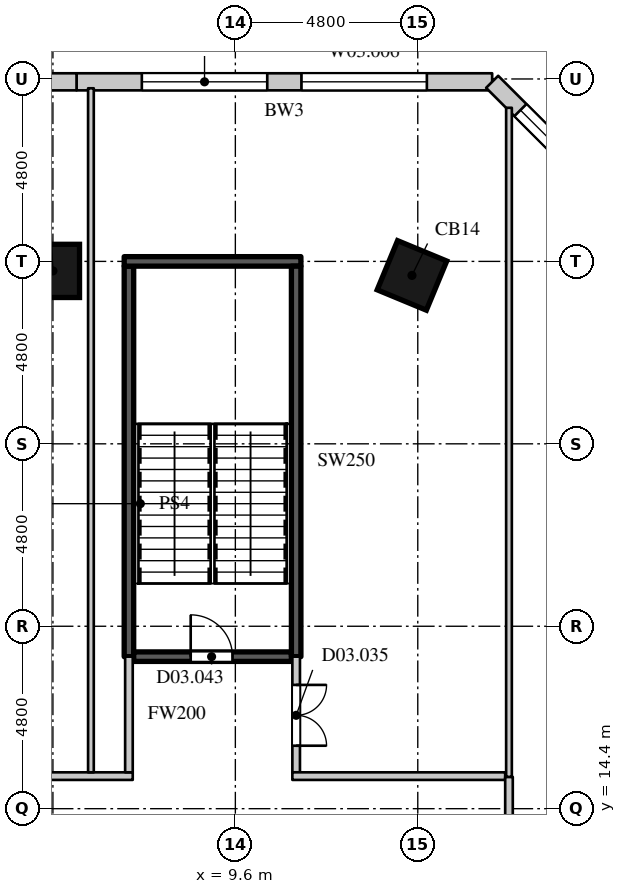
"""IFC4 building model, lengths in metres.
Left out: names, types, materials, properties, quantities, classifications, styles, units other than length and angle.
Written with IfcOpenShell. Run it as: python <this file> out.ifc"""

import sys

from ifc_helpers import new_model, si_unit, direction, frame, frame_2d, origin, origin_2d, place, context, subcontext, project, spatial, rectangle, extrude, element, fill, save


model = new_model("IFC4")
c1 = context("Model", 3, precision=1e-05, world=origin(), true_north=direction((0.0, 1.0)))
c2 = subcontext(c1, "Body", "Model", "MODEL_VIEW")
j1 = project(units=[si_unit("LENGTHUNIT", "METRE"), si_unit("PLANEANGLEUNIT", "RADIAN")], contexts=[c1])
p1 = place(None, origin())
s1 = spatial("IfcSite", under=j1, at=p1, CompositionType="ELEMENT")
p2 = place(p1, origin())
s2 = spatial("IfcBuilding", under=s1, at=p2, CompositionType="ELEMENT")
p3 = place(p2, frame((0.0, 0.0, 16.0)))
s3 = spatial("IfcBuildingStorey", under=s2, at=p3, CompositionType="ELEMENT", Elevation=16.0)
for number, where, z_axis, x_axis in (
    (1, (14.247, 28.431, 0.0), (0.0, 0.0, 1.0), (-0.924, 0.383, 0.0)),
    (2, (4.8, 28.55, 0.0), (0.0, 0.0, 1.0), (-1.0, 0.0, 0.0)),
):
    element("IfcColumn", number, at=place(p3, frame(where, z_axis=z_axis, x_axis=x_axis)), inside=s3, PredefinedType="COLUMN", context=c2, shape_type="SweptSolid", body=[
        extrude(rectangle(XDim=1.4, YDim=1.4, at=origin_2d()), origin(), (0.0, 0.0, 1.0), 5.0),
    ])
p4 = place(p3, frame((22.102, 27.781, 0.0), z_axis=(0.0, 0.0, 1.0), x_axis=(-0.70712180699, 0.707091755064, 0.0)))
e3 = element("IfcWall", 3, at=p4, inside=s3, PredefinedType="ELEMENTEDWALL", context=c2, shape_type="SweptSolid", body=[
    extrude(rectangle(XDim=8.124, YDim=0.45, at=frame_2d((4.062, 0.0))), origin(), (0.0, 0.0, 1.0), 4.7),
])
p5 = place(p4, frame((0.312, 0.0, 1.05)))
e4 = element("IfcOpeningElement", 4, at=p5, cuts=e3, PredefinedType="OPENING", context=c2, shape_type="SweptSolid", body=[
    extrude(rectangle(XDim=3.3, YDim=2.7, at=frame_2d((1.65, 1.35))), frame((0.0, 0.235, 0.0), z_axis=(0.0, -1.0, 0.0), x_axis=(1.0, 0.0, 0.0)), (0.0, 0.0, 1.0), 0.47),
])
p6 = place(p4, frame((4.512, 0.0, 1.05)))
e5 = element("IfcOpeningElement", 5, at=p6, cuts=e3, PredefinedType="OPENING", context=c2, shape_type="SweptSolid", body=[
    extrude(rectangle(XDim=2.56, YDim=2.7, at=frame_2d((1.28, 1.35))), frame((0.0, 0.235, 0.0), z_axis=(0.0, -1.0, 0.0), x_axis=(1.0, 0.0, 0.0)), (0.0, 0.0, 1.0), 0.47),
])
p7 = place(p3, frame((16.357, 33.525, 0.0), z_axis=(0.0, 0.0, 1.0), x_axis=(-1.0, 0.0, 0.0)))
e6 = element("IfcWall", 6, at=p7, inside=s3, PredefinedType="ELEMENTEDWALL", context=c2, shape_type="SweptSolid", body=[
    extrude(rectangle(XDim=10.936, YDim=0.45, at=frame_2d((5.468, 0.0))), origin(), (0.0, 0.0, 1.0), 4.7),
])
p8 = place(p7, frame((1.718, 0.0, 1.05)))
e7 = element("IfcOpeningElement", 7, at=p8, cuts=e6, PredefinedType="OPENING", context=c2, shape_type="SweptSolid", body=[
    extrude(rectangle(XDim=3.3, YDim=2.7, at=frame_2d((1.65, 1.35))), frame((0.0, 0.235, 0.0), z_axis=(0.0, -1.0, 0.0), x_axis=(1.0, 0.0, 0.0)), (0.0, 0.0, 1.0), 0.47),
])
p9 = place(p7, frame((5.918, 0.0, 1.05)))
e8 = element("IfcOpeningElement", 8, at=p9, cuts=e6, PredefinedType="OPENING", context=c2, shape_type="SweptSolid", body=[
    extrude(rectangle(XDim=3.3, YDim=2.7, at=frame_2d((1.65, 1.35))), frame((0.0, 0.235, 0.0), z_axis=(0.0, -1.0, 0.0), x_axis=(1.0, 0.0, 0.0)), (0.0, 0.0, 1.0), 0.47),
])
p10 = place(p3, frame((5.421, 33.525, 0.0), z_axis=(0.0, 0.0, 1.0), x_axis=(-1.0, 0.0, 0.0)))
e9 = element("IfcWall", 9, at=p10, inside=s3, PredefinedType="ELEMENTEDWALL", context=c2, shape_type="SweptSolid", body=[
    extrude(rectangle(XDim=10.843, YDim=0.45, at=frame_2d((5.421, 0.0))), origin(), (0.0, 0.0, 1.0), 4.7),
])
p11 = place(p10, frame((1.511, 0.0, 0.0)))
e10 = element("IfcOpeningElement", 10, at=p11, cuts=e9, PredefinedType="OPENING", context=c2, shape_type="SweptSolid", body=[
    extrude(rectangle(XDim=2.4, YDim=2.7, at=frame_2d((1.2, 1.35))), frame((0.0, 0.235, 0.0), z_axis=(0.0, -1.0, 0.0), x_axis=(1.0, 0.0, 0.0)), (0.0, 0.0, 1.0), 0.47),
])
p12 = place(p10, frame((5.871, 0.0, 1.05)))
e11 = element("IfcOpeningElement", 11, at=p12, cuts=e9, PredefinedType="OPENING", context=c2, shape_type="SweptSolid", body=[
    extrude(rectangle(XDim=3.3, YDim=2.7, at=frame_2d((1.65, 1.35))), frame((0.0, 0.235, 0.0), z_axis=(0.0, -1.0, 0.0), x_axis=(1.0, 0.0, 0.0)), (0.0, 0.0, 1.0), 0.47),
])
p13 = place(p3, frame((-6.9, 15.257, 0.0), z_axis=(0.0, 0.0, 1.0), x_axis=(1.0, 0.0, 0.0)))
e12 = element("IfcWall", 12, at=p13, inside=s3, PredefinedType="PARTITIONING", context=c2, shape_type="SweptSolid", body=[
    extrude(rectangle(XDim=13.8, YDim=0.2, at=frame_2d((6.9, 0.0))), origin(), (0.0, 0.0, 1.0), 4.4),
])
p14 = place(p13, frame((6.1, 0.0, 0.0)))
e13 = element("IfcOpeningElement", 13, at=p14, cuts=e12, PredefinedType="OPENING", context=c2, shape_type="SweptSolid", body=[
    extrude(rectangle(XDim=1.6, YDim=2.4, at=frame_2d((0.8, 1.2))), frame((0.0, 0.11, 0.0), z_axis=(0.0, -1.0, 0.0), x_axis=(1.0, 0.0, 0.0)), (0.0, 0.0, 1.0), 0.22),
])
p15 = place(p3, frame((6.8, 15.357, 0.0), z_axis=(0.0, 0.0, 1.0), x_axis=(0.0, 1.0, 0.0)))
e14 = element("IfcWall", 14, at=p15, inside=s3, PredefinedType="PARTITIONING", context=c2, shape_type="SweptSolid", body=[
    extrude(rectangle(XDim=3.043, YDim=0.2, at=frame_2d((1.521, 0.0))), origin(), (0.0, 0.0, 1.0), 4.4),
])
p16 = place(p3, frame((11.2, 15.357, 0.0), z_axis=(0.0, 0.0, 1.0), x_axis=(0.0, 1.0, 0.0)))
e15 = element("IfcWall", 15, at=p16, inside=s3, PredefinedType="PARTITIONING", context=c2, shape_type="SweptSolid", body=[
    extrude(rectangle(XDim=3.043, YDim=0.2, at=frame_2d((1.521, 0.0))), origin(), (0.0, 0.0, 1.0), 4.4),
])
p17 = place(p16, frame((0.7, 0.0, 0.0)))
e16 = element("IfcOpeningElement", 16, at=p17, cuts=e15, PredefinedType="OPENING", context=c2, shape_type="SweptSolid", body=[
    extrude(rectangle(XDim=1.6, YDim=2.4, at=frame_2d((0.8, 1.2))), frame((0.0, 0.11, 0.0), z_axis=(0.0, -1.0, 0.0), x_axis=(1.0, 0.0, 0.0)), (0.0, 0.0, 1.0), 0.22),
])
p18 = place(p3, frame((11.1, 15.257, 0.0), z_axis=(0.0, 0.0, 1.0), x_axis=(1.0, 0.0, 0.0)))
e17 = element("IfcWall", 17, at=p18, inside=s3, PredefinedType="PARTITIONING", context=c2, shape_type="SweptSolid", body=[
    extrude(rectangle(XDim=5.6, YDim=0.2, at=frame_2d((2.8, 0.0))), origin(), (0.0, 0.0, 1.0), 4.4),
])
p19 = place(p3, frame((16.8, 11.3, 0.0), z_axis=(0.0, 0.0, 1.0), x_axis=(0.0, 1.0, 0.0)))
e18 = element("IfcWall", 18, at=p19, inside=s3, PredefinedType="PARTITIONING", context=c2, shape_type="SweptSolid", body=[
    extrude(rectangle(XDim=3.937, YDim=0.2, at=frame_2d((1.968, 0.0))), origin(), (0.0, 0.0, 1.0), 4.4),
])
p20 = place(p3, frame((5.8, 15.357, 0.0), z_axis=(0.0, 0.0, 1.0), x_axis=(0.0, 1.0, 0.0)))
e19 = element("IfcWall", 19, at=p20, inside=s3, PredefinedType="PARTITIONING", context=c2, shape_type="SweptSolid", body=[
    extrude(rectangle(XDim=17.998, YDim=0.15, at=frame_2d((8.999, 0.0))), origin(), (0.0, 0.0, 1.0), 4.4),
])
p21 = place(p3, frame((16.8, 15.237, 0.0), z_axis=(0.0, 0.0, 1.0), x_axis=(0.0, 1.0, 0.0)))
e20 = element("IfcWall", 20, at=p21, inside=s3, PredefinedType="PARTITIONING", context=c2, shape_type="SweptSolid", body=[
    extrude(rectangle(XDim=17.605, YDim=0.15, at=frame_2d((8.802, 0.0))), origin(), (0.0, 0.0, 1.0), 4.4),
])
p22 = place(p3, frame((6.8, 18.4, 0.0), z_axis=(0.0, 0.0, 1.0), x_axis=(0.0, 1.0, 0.0)))
e21 = element("IfcWall", 21, at=p22, inside=s3, PredefinedType="SHEAR", context=c2, shape_type="SweptSolid", body=[
    extrude(rectangle(XDim=10.275, YDim=0.25, at=frame_2d((5.138, 0.0))), origin(), (0.0, 0.0, 1.0), 4.65),
])
p23 = place(p3, frame((6.925, 18.4, 0.0), z_axis=(0.0, 0.0, 1.0), x_axis=(1.0, 0.0, 0.0)))
e22 = element("IfcWall", 22, at=p23, inside=s3, PredefinedType="SHEAR", context=c2, shape_type="SweptSolid", body=[
    extrude(rectangle(XDim=4.15, YDim=0.25, at=frame_2d((2.075, 0.0))), origin(), (0.0, 0.0, 1.0), 4.65),
])
p24 = place(p23, frame((1.5, 0.0, 0.0)))
e23 = element("IfcOpeningElement", 23, at=p24, cuts=e22, PredefinedType="OPENING", context=c2, shape_type="SweptSolid", body=[
    extrude(rectangle(XDim=1.1, YDim=2.2, at=frame_2d((0.55, 1.1))), frame((0.0, 0.135, 0.0), z_axis=(0.0, -1.0, 0.0), x_axis=(1.0, 0.0, 0.0)), (0.0, 0.0, 1.0), 0.27),
])
p25 = place(p3, frame((6.675, 28.8, 0.0), z_axis=(0.0, 0.0, 1.0), x_axis=(1.0, 0.0, 0.0)))
e24 = element("IfcWall", 24, at=p25, inside=s3, PredefinedType="SHEAR", context=c2, shape_type="SweptSolid", body=[
    extrude(rectangle(XDim=4.65, YDim=0.25, at=frame_2d((2.325, 0.0))), origin(), (0.0, 0.0, 1.0), 4.65),
])
p26 = place(p3, frame((11.2, 18.4, 0.0), z_axis=(0.0, 0.0, 1.0), x_axis=(0.0, 1.0, 0.0)))
e25 = element("IfcWall", 25, at=p26, inside=s3, PredefinedType="SHEAR", context=c2, shape_type="SweptSolid", body=[
    extrude(rectangle(XDim=10.275, YDim=0.25, at=frame_2d((5.138, 0.0))), origin(), (0.0, 0.0, 1.0), 4.65),
])
p27 = place(p6, origin())
e26 = element("IfcWindow", 26, at=p27, inside=s3, PartitioningType="SINGLE_PANEL", PredefinedType="WINDOW", context=c2, shape_type="SweptSolid", body=[
    extrude(rectangle(XDim=2.56, YDim=2.7, at=frame_2d((1.28, 1.35))), frame((0.0, 0.135, 0.0), z_axis=(0.0, -1.0, 0.0), x_axis=(1.0, 0.0, 0.0)), (0.0, 0.0, 1.0), 0.06),
])
fill(e5, e26)
p28 = place(p8, origin())
e27 = element("IfcWindow", 27, at=p28, inside=s3, PartitioningType="SINGLE_PANEL", PredefinedType="WINDOW", context=c2, shape_type="SweptSolid", body=[
    extrude(rectangle(XDim=3.3, YDim=2.7, at=frame_2d((1.65, 1.35))), frame((0.0, 0.135, 0.0), z_axis=(0.0, -1.0, 0.0), x_axis=(1.0, 0.0, 0.0)), (0.0, 0.0, 1.0), 0.06),
])
fill(e7, e27)
p29 = place(p9, origin())
e28 = element("IfcWindow", 28, at=p29, inside=s3, PartitioningType="SINGLE_PANEL", PredefinedType="WINDOW", context=c2, shape_type="SweptSolid", body=[
    extrude(rectangle(XDim=3.3, YDim=2.7, at=frame_2d((1.65, 1.35))), frame((0.0, 0.135, 0.0), z_axis=(0.0, -1.0, 0.0), x_axis=(1.0, 0.0, 0.0)), (0.0, 0.0, 1.0), 0.06),
])
fill(e8, e28)
p30 = place(p17, origin())
e29 = element("IfcDoor", 29, at=p30, inside=s3, OperationType="DOUBLE_DOOR_SINGLE_SWING", PredefinedType="DOOR", context=c2, shape_type="SweptSolid", body=[
    extrude(rectangle(XDim=1.6, YDim=2.4, at=frame_2d((0.8, 1.2))), frame((0.0, 0.025, 0.0), z_axis=(0.0, -1.0, 0.0), x_axis=(1.0, 0.0, 0.0)), (0.0, 0.0, 1.0), 0.05),
])
fill(e16, e29)
p31 = place(p24, origin())
e30 = element("IfcDoor", 30, at=p31, inside=s3, OperationType="SINGLE_SWING_LEFT", PredefinedType="DOOR", context=c2, shape_type="SweptSolid", body=[
    extrude(rectangle(XDim=1.1, YDim=2.2, at=frame_2d((0.55, 1.1))), frame((0.0, 0.025, 0.0), z_axis=(0.0, -1.0, 0.0), x_axis=(1.0, 0.0, 0.0)), (0.0, 0.0, 1.0), 0.05),
])
fill(e23, e30)
save(model, sys.argv[1])
